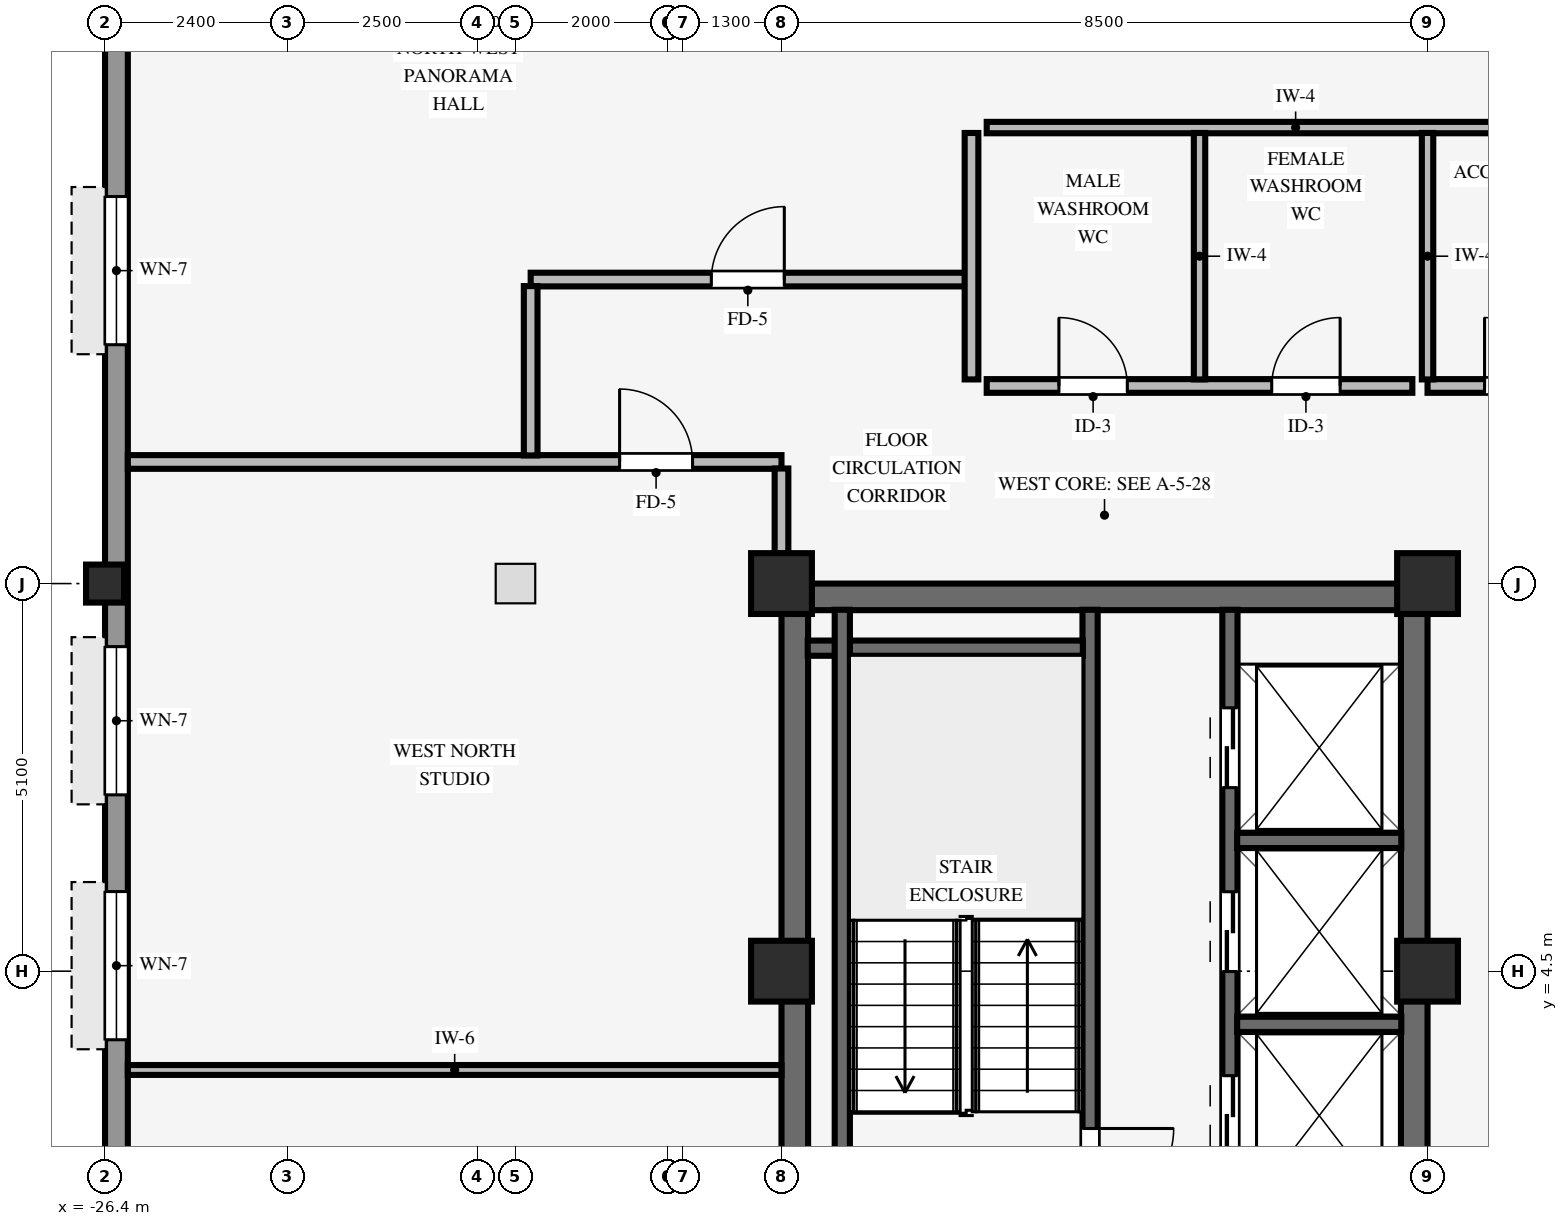
"""IFC4 building model, lengths in metres.
Left out: names, types, materials, properties, quantities, classifications, styles, units other than length and angle.
Written with IfcOpenShell. Run it as: python <this file> out.ifc"""

import sys

from ifc_helpers import new_model, si_unit, direction, frame, frame_2d, origin, origin_2d, place, context, subcontext, project, spatial, rectangle, hollow_rectangle, extrude, source, transform, mapped, element, fill, save


model = new_model("IFC4")
c1 = context("Model", 3, precision=1e-05, world=origin(), true_north=direction((0.0, 1.0)))
c2 = subcontext(c1, "Body", "Model", "MODEL_VIEW")
j1 = project(units=[si_unit("LENGTHUNIT", "METRE"), si_unit("PLANEANGLEUNIT", "RADIAN")], contexts=[c1])
p1 = place(None, origin())
s1 = spatial("IfcSite", under=j1, at=p1, CompositionType="ELEMENT")
p2 = place(p1, origin())
s2 = spatial("IfcBuilding", under=s1, at=p2, CompositionType="ELEMENT")
p3 = place(p2, frame((0.0, 0.0, 242.0)))
s3 = spatial("IfcBuildingStorey", under=s2, at=p3, CompositionType="ELEMENT", Elevation=242.0)
p4 = place(p3, frame((-17.5, 9.425, 0.0), z_axis=(0.0, 0.0, 1.0), x_axis=(1.0, 0.0, 0.0)))
e1 = element("IfcWall", 1, at=p4, inside=s3, PredefinedType="SHEAR", context=c2, shape_type="SweptSolid", body=[
    extrude(rectangle(XDim=8.5, YDim=0.35, at=frame_2d((4.25, 0.0))), origin(), (0.0, 0.0, 1.0), 3.25),
])
p5 = place(p3, frame((-17.325, -9.255, 0.0), z_axis=(0.0, 0.0, 1.0), x_axis=(0.0, 1.0, 0.0)))
e2 = element("IfcWall", 2, at=p5, inside=s3, PredefinedType="SHEAR", context=c2, shape_type="SweptSolid", body=[
    extrude(rectangle(XDim=18.51, YDim=0.35, at=frame_2d((9.255, 0.0))), origin(), (0.0, 0.0, 1.0), 3.25),
])
p6 = place(p3, frame((-9.175, -9.255, 0.0), z_axis=(0.0, 0.0, 1.0), x_axis=(0.0, 1.0, 0.0)))
e3 = element("IfcWall", 3, at=p6, inside=s3, PredefinedType="SHEAR", context=c2, shape_type="SweptSolid", body=[
    extrude(rectangle(XDim=18.51, YDim=0.35, at=frame_2d((9.255, 0.0))), origin(), (0.0, 0.0, 1.0), 3.25),
])
p7 = place(p6, frame((8.655, 0.0, 0.0)))
e4 = element("IfcOpeningElement", 4, at=p7, cuts=e3, PredefinedType="OPENING", context=c2, shape_type="SweptSolid", body=[
    extrude(rectangle(XDim=1.2, YDim=2.15, at=frame_2d((0.6, 1.075))), frame((0.0, 0.185, 0.0), z_axis=(0.0, -1.0, 0.0), x_axis=(1.0, 0.0, 0.0)), (0.0, 0.0, 1.0), 0.37),
])
for number, where, z_axis, x_axis in (
    (5, (-17.5, 4.5, 0.0), (0.0, 0.0, 1.0), (1.0, 0.0, 0.0)),
    (6, (-17.5, 9.6, 0.0), (0.0, 0.0, 1.0), (1.0, 0.0, 0.0)),
    (7, (-9.0, 4.5, 0.0), (0.0, 0.0, 1.0), (1.0, 0.0, 0.0)),
    (8, (-9.0, 9.6, 0.0), (0.0, 0.0, 1.0), (1.0, 0.0, 0.0)),
):
    element("IfcColumn", number, at=place(p3, frame(where, z_axis=z_axis, x_axis=x_axis)), inside=s3, PredefinedType="COLUMN", context=c2, shape_type="SweptSolid", body=[
        extrude(rectangle(XDim=0.8, YDim=0.8, at=origin_2d()), origin(), (0.0, 0.0, 1.0), 3.25),
    ])
p8 = place(p3, frame((-26.4, 9.6, 0.0), z_axis=(0.0, 0.0, 1.0), x_axis=(1.0, 0.0, 0.0)))
e9 = element("IfcColumn", 9, at=p8, inside=s3, PredefinedType="COLUMN", context=c2, shape_type="SweptSolid", body=[
    extrude(hollow_rectangle(XDim=0.5, YDim=0.5, WallThickness=0.032, InnerFilletRadius=0.032, OuterFilletRadius=0.064, at=origin_2d()), origin(), (0.0, 0.0, 1.0), 3.25),
])
p9 = place(p3, frame((-26.25, -17.004, 0.0), z_axis=(0.0, 0.0, 1.0), x_axis=(0.0, 1.0, 0.0)))
e10 = element("IfcWall", 10, at=p9, inside=s3, PredefinedType="STANDARD", context=c2, shape_type="SweptSolid", body=[
    extrude(rectangle(XDim=34.008, YDim=0.3, at=frame_2d((17.004, 0.0))), origin(), (0.0, 0.0, 1.0), 2.812),
])
p10 = place(p9, frame((2.311, 0.0, 0.8)))
e11 = element("IfcOpeningElement", 11, at=p10, cuts=e10, PredefinedType="OPENING", context=c2, shape_type="SweptSolid", body=[
    extrude(rectangle(XDim=1.95, YDim=1.48, at=frame_2d((0.975, 0.74))), frame((0.0, 0.16, 0.0), z_axis=(0.0, -1.0, 0.0), x_axis=(1.0, 0.0, 0.0)), (0.0, 0.0, 1.0), 0.32),
])
p11 = place(p9, frame((8.234, 0.0, 0.8)))
e12 = element("IfcOpeningElement", 12, at=p11, cuts=e10, PredefinedType="OPENING", context=c2, shape_type="SweptSolid", body=[
    extrude(rectangle(XDim=1.95, YDim=1.48, at=frame_2d((0.975, 0.74))), frame((0.0, 0.16, 0.0), z_axis=(0.0, -1.0, 0.0), x_axis=(1.0, 0.0, 0.0)), (0.0, 0.0, 1.0), 0.32),
])
p12 = place(p9, frame((11.456, 0.0, 0.8)))
e13 = element("IfcOpeningElement", 13, at=p12, cuts=e10, PredefinedType="OPENING", context=c2, shape_type="SweptSolid", body=[
    extrude(rectangle(XDim=1.95, YDim=1.48, at=frame_2d((0.975, 0.74))), frame((0.0, 0.16, 0.0), z_axis=(0.0, -1.0, 0.0), x_axis=(1.0, 0.0, 0.0)), (0.0, 0.0, 1.0), 0.32),
])
p13 = place(p9, frame((20.602, 0.0, 0.8)))
e14 = element("IfcOpeningElement", 14, at=p13, cuts=e10, PredefinedType="OPENING", context=c2, shape_type="SweptSolid", body=[
    extrude(rectangle(XDim=1.95, YDim=1.48, at=frame_2d((0.975, 0.74))), frame((0.0, 0.16, 0.0), z_axis=(0.0, -1.0, 0.0), x_axis=(1.0, 0.0, 0.0)), (0.0, 0.0, 1.0), 0.32),
])
p14 = place(p9, frame((23.824, 0.0, 0.8)))
e15 = element("IfcOpeningElement", 15, at=p14, cuts=e10, PredefinedType="OPENING", context=c2, shape_type="SweptSolid", body=[
    extrude(rectangle(XDim=1.95, YDim=1.48, at=frame_2d((0.975, 0.74))), frame((0.0, 0.16, 0.0), z_axis=(0.0, -1.0, 0.0), x_axis=(1.0, 0.0, 0.0)), (0.0, 0.0, 1.0), 0.32),
])
p15 = place(p9, frame((29.747, 0.0, 0.8)))
e16 = element("IfcOpeningElement", 16, at=p15, cuts=e10, PredefinedType="OPENING", context=c2, shape_type="SweptSolid", body=[
    extrude(rectangle(XDim=1.95, YDim=1.48, at=frame_2d((0.975, 0.74))), frame((0.0, 0.16, 0.0), z_axis=(0.0, -1.0, 0.0), x_axis=(1.0, 0.0, 0.0)), (0.0, 0.0, 1.0), 0.32),
])
p16 = place(p3, frame((-13.44, 0.9, 0.0), z_axis=(0.0, 0.0, 1.0), x_axis=(0.0, 1.0, 0.0)))
e17 = element("IfcWall", 17, at=p16, inside=s3, PredefinedType="SHEAR", context=c2, shape_type="SweptSolid", body=[
    extrude(rectangle(XDim=8.355, YDim=0.2, at=frame_2d((4.177, 0.0))), origin(), (0.0, 0.0, 1.0), 3.25),
])
p17 = place(p16, frame((1.53, 0.0, 0.0), z_axis=(0.0, 0.0, 1.0), x_axis=(-1.0, 0.0, 0.0)))
e18 = element("IfcOpeningElement", 18, at=p17, cuts=e17, PredefinedType="OPENING", context=c2, shape_type="SweptSolid", body=[
    extrude(rectangle(XDim=1.1, YDim=2.15, at=frame_2d((0.55, 1.075))), frame((0.0, 0.11, 0.0), z_axis=(0.0, -1.0, 0.0), x_axis=(1.0, 0.0, 0.0)), (0.0, 0.0, 1.0), 0.22),
])
p18 = place(p3, frame((-17.155, 8.75, 0.0), z_axis=(0.0, 0.0, 1.0), x_axis=(1.0, 0.0, 0.0)))
e19 = element("IfcWall", 19, at=p18, inside=s3, PredefinedType="SHEAR", context=c2, shape_type="SweptSolid", body=[
    extrude(rectangle(XDim=3.62, YDim=0.2, at=frame_2d((1.81, 0.0))), origin(), (0.0, 0.0, 1.0), 3.25),
])
p19 = place(p3, frame((-16.7, 1.095, 0.0), z_axis=(0.0, 0.0, 1.0), x_axis=(0.0, 1.0, 0.0)))
e20 = element("IfcWall", 20, at=p19, inside=s3, PredefinedType="SHEAR", context=c2, shape_type="SweptSolid", body=[
    extrude(rectangle(XDim=8.16, YDim=0.2, at=frame_2d((4.08, 0.0))), origin(), (0.0, 0.0, 1.0), 3.25),
])
p20 = place(p3, frame((-11.6, 1.3, 0.0), z_axis=(0.0, 0.0, 1.0), x_axis=(0.0, 1.0, 0.0)))
e21 = element("IfcWall", 21, at=p20, inside=s3, PredefinedType="SHEAR", context=c2, shape_type="SweptSolid", body=[
    extrude(rectangle(XDim=7.955, YDim=0.2, at=frame_2d((3.978, 0.0))), origin(), (0.0, 0.0, 1.0), 3.25),
])
p21 = place(p20, frame((0.775, 0.0, 0.0)))
e22 = element("IfcOpeningElement", 22, at=p21, cuts=e21, PredefinedType="OPENING", context=c2, shape_type="SweptSolid", body=[
    extrude(rectangle(XDim=1.05, YDim=2.15, at=frame_2d((0.525, 1.075))), frame((0.0, 0.11, 0.0), z_axis=(0.0, -1.0, 0.0), x_axis=(1.0, 0.0, 0.0)), (0.0, 0.0, 1.0), 0.22),
])
p22 = place(p20, frame((3.195, 0.0, 0.0)))
e23 = element("IfcOpeningElement", 23, at=p22, cuts=e21, PredefinedType="OPENING", context=c2, shape_type="SweptSolid", body=[
    extrude(rectangle(XDim=1.05, YDim=2.15, at=frame_2d((0.525, 1.075))), frame((0.0, 0.11, 0.0), z_axis=(0.0, -1.0, 0.0), x_axis=(1.0, 0.0, 0.0)), (0.0, 0.0, 1.0), 0.22),
])
p23 = place(p20, frame((5.615, 0.0, 0.0)))
e24 = element("IfcOpeningElement", 24, at=p23, cuts=e21, PredefinedType="OPENING", context=c2, shape_type="SweptSolid", body=[
    extrude(rectangle(XDim=1.05, YDim=2.15, at=frame_2d((0.525, 1.075))), frame((0.0, 0.11, 0.0), z_axis=(0.0, -1.0, 0.0), x_axis=(1.0, 0.0, 0.0)), (0.0, 0.0, 1.0), 0.22),
])
for number, where, z_axis, x_axis in (
    (25, (-11.505, 3.8, 0.0), (0.0, 0.0, 1.0), (1.0, 0.0, 0.0)),
    (26, (-11.505, 6.22, 0.0), (0.0, 0.0, 1.0), (1.0, 0.0, 0.0)),
):
    element("IfcWall", number, at=place(p3, frame(where, z_axis=z_axis, x_axis=x_axis)), inside=s3, PredefinedType="SHEAR", context=c2, shape_type="SweptSolid", body=[
        extrude(rectangle(XDim=2.16, YDim=0.2, at=frame_2d((1.08, 0.0))), origin(), (0.0, 0.0, 1.0), 3.25),
    ])
p24 = place(p3, frame((-26.1, 3.2, 0.0), z_axis=(0.0, 0.0, 1.0), x_axis=(1.0, 0.0, 0.0)))
e27 = element("IfcWall", 27, at=p24, inside=s3, PredefinedType="PARTITIONING", context=c2, shape_type="SweptSolid", body=[
    extrude(rectangle(XDim=8.6, YDim=0.13, at=frame_2d((4.3, 0.0))), origin(), (0.0, 0.0, 1.0), 3.24),
])
p25 = place(p3, frame((-26.1, 11.2, 0.0), z_axis=(0.0, 0.0, 1.0), x_axis=(1.0, 0.0, 0.0)))
e28 = element("IfcWall", 28, at=p25, inside=s3, PredefinedType="PARTITIONING", context=c2, shape_type="SweptSolid", body=[
    extrude(rectangle(XDim=8.6, YDim=0.18, at=frame_2d((4.3, 0.0))), origin(), (0.0, 0.0, 1.0), 3.24),
])
p26 = place(p25, frame((6.47, 0.0, 0.0)))
e29 = element("IfcOpeningElement", 29, at=p26, cuts=e28, PredefinedType="OPENING", context=c2, shape_type="SweptSolid", body=[
    extrude(rectangle(XDim=0.96, YDim=2.1, at=frame_2d((0.48, 1.05))), frame((0.0, 0.1, 0.0), z_axis=(0.0, -1.0, 0.0), x_axis=(1.0, 0.0, 0.0)), (0.0, 0.0, 1.0), 0.2),
])
p27 = place(p3, frame((-14.8, 12.2, 0.0), z_axis=(0.0, 0.0, 1.0), x_axis=(1.0, 0.0, 0.0)))
e30 = element("IfcWall", 30, at=p27, inside=s3, PredefinedType="PARTITIONING", context=c2, shape_type="SweptSolid", body=[
    extrude(rectangle(XDim=5.6, YDim=0.18, at=frame_2d((2.8, 0.0))), origin(), (0.0, 0.0, 1.0), 3.24),
])
p28 = place(p27, frame((0.95, 0.0, 0.0)))
e31 = element("IfcOpeningElement", 31, at=p28, cuts=e30, PredefinedType="OPENING", context=c2, shape_type="SweptSolid", body=[
    extrude(rectangle(XDim=0.9, YDim=2.1, at=frame_2d((0.45, 1.05))), frame((0.0, 0.1, 0.0), z_axis=(0.0, -1.0, 0.0), x_axis=(1.0, 0.0, 0.0)), (0.0, 0.0, 1.0), 0.2),
])
p29 = place(p27, frame((3.75, 0.0, 0.0)))
e32 = element("IfcOpeningElement", 32, at=p29, cuts=e30, PredefinedType="OPENING", context=c2, shape_type="SweptSolid", body=[
    extrude(rectangle(XDim=0.9, YDim=2.1, at=frame_2d((0.45, 1.05))), frame((0.0, 0.1, 0.0), z_axis=(0.0, -1.0, 0.0), x_axis=(1.0, 0.0, 0.0)), (0.0, 0.0, 1.0), 0.2),
])
p30 = place(p3, frame((-9.0, 12.2, 0.0), z_axis=(0.0, 0.0, 1.0), x_axis=(1.0, 0.0, 0.0)))
e33 = element("IfcWall", 33, at=p30, inside=s3, PredefinedType="PARTITIONING", context=c2, shape_type="SweptSolid", body=[
    extrude(rectangle(XDim=24.8, YDim=0.18, at=frame_2d((12.4, 0.0))), origin(), (0.0, 0.0, 1.0), 3.24),
])
p31 = place(p30, frame((11.42, 0.0, 0.0)))
e34 = element("IfcOpeningElement", 34, at=p31, cuts=e33, PredefinedType="OPENING", context=c2, shape_type="SweptSolid", body=[
    extrude(rectangle(XDim=0.96, YDim=2.1, at=frame_2d((0.48, 1.05))), frame((0.0, 0.1, 0.0), z_axis=(0.0, -1.0, 0.0), x_axis=(1.0, 0.0, 0.0)), (0.0, 0.0, 1.0), 0.2),
])
p32 = place(p30, frame((20.92, 0.0, 0.0)))
e35 = element("IfcOpeningElement", 35, at=p32, cuts=e33, PredefinedType="OPENING", context=c2, shape_type="SweptSolid", body=[
    extrude(rectangle(XDim=0.96, YDim=2.1, at=frame_2d((0.48, 1.05))), frame((0.0, 0.1, 0.0), z_axis=(0.0, -1.0, 0.0), x_axis=(1.0, 0.0, 0.0)), (0.0, 0.0, 1.0), 0.2),
])
p33 = place(p30, frame((4.82, 0.0, 0.0)))
e36 = element("IfcOpeningElement", 36, at=p33, cuts=e33, PredefinedType="OPENING", context=c2, shape_type="SweptSolid", body=[
    extrude(rectangle(XDim=0.96, YDim=2.1, at=frame_2d((0.48, 1.05))), frame((0.0, 0.1, 0.0), z_axis=(0.0, -1.0, 0.0), x_axis=(1.0, 0.0, 0.0)), (0.0, 0.0, 1.0), 0.2),
])
p34 = place(p30, frame((0.75, 0.0, 0.0)))
e37 = element("IfcOpeningElement", 37, at=p34, cuts=e33, PredefinedType="OPENING", context=c2, shape_type="SweptSolid", body=[
    extrude(rectangle(XDim=0.9, YDim=2.1, at=frame_2d((0.45, 1.05))), frame((0.0, 0.1, 0.0), z_axis=(0.0, -1.0, 0.0), x_axis=(1.0, 0.0, 0.0)), (0.0, 0.0, 1.0), 0.2),
])
p35 = place(p3, frame((-20.8, 13.6, 0.0), z_axis=(0.0, 0.0, 1.0), x_axis=(1.0, 0.0, 0.0)))
e38 = element("IfcWall", 38, at=p35, inside=s3, PredefinedType="PARTITIONING", context=c2, shape_type="SweptSolid", body=[
    extrude(rectangle(XDim=5.714, YDim=0.18, at=frame_2d((2.857, 0.0))), origin(), (0.0, 0.0, 1.0), 2.929),
])
p36 = place(p35, frame((2.377, 0.0, 0.0)))
e39 = element("IfcOpeningElement", 39, at=p36, cuts=e38, PredefinedType="OPENING", context=c2, shape_type="SweptSolid", body=[
    extrude(rectangle(XDim=0.96, YDim=2.1, at=frame_2d((0.48, 1.05))), frame((0.0, 0.1, 0.0), z_axis=(0.0, -1.0, 0.0), x_axis=(1.0, 0.0, 0.0)), (0.0, 0.0, 1.0), 0.2),
])
p37 = place(p3, frame((-14.8, 15.6, 0.0), z_axis=(0.0, 0.0, 1.0), x_axis=(1.0, 0.0, 0.0)))
e40 = element("IfcWall", 40, at=p37, inside=s3, PredefinedType="PARTITIONING", context=c2, shape_type="SweptSolid", body=[
    extrude(rectangle(XDim=8.129, YDim=0.15, at=frame_2d((4.064, 0.0))), origin(), (0.0, 0.0, 1.0), 3.24),
])
p38 = place(p3, frame((-20.8, 11.286, 0.0), z_axis=(0.0, 0.0, 1.0), x_axis=(0.0, 1.0, 0.0)))
e41 = element("IfcWall", 41, at=p38, inside=s3, PredefinedType="PARTITIONING", context=c2, shape_type="SweptSolid", body=[
    extrude(rectangle(XDim=2.228, YDim=0.18, at=frame_2d((1.114, 0.0))), origin(), (0.0, 0.0, 1.0), 2.585),
])
p39 = place(p3, frame((-17.5, 9.996, 0.0), z_axis=(0.0, 0.0, 1.0), x_axis=(0.0, 1.0, 0.0)))
e42 = element("IfcWall", 42, at=p39, inside=s3, PredefinedType="PARTITIONING", context=c2, shape_type="SweptSolid", body=[
    extrude(rectangle(XDim=1.118, YDim=0.18, at=frame_2d((0.559, 0.0))), origin(), (0.0, 0.0, 1.0), 2.772),
])
p40 = place(p3, frame((-15.0, 12.286, 0.0), z_axis=(0.0, 0.0, 1.0), x_axis=(0.0, 1.0, 0.0)))
e43 = element("IfcWall", 43, at=p40, inside=s3, PredefinedType="PARTITIONING", context=c2, shape_type="SweptSolid", body=[
    extrude(rectangle(XDim=3.243, YDim=0.18, at=frame_2d((1.622, 0.0))), origin(), (0.0, 0.0, 1.0), 3.24),
])
p41 = place(p3, frame((-12.0, 12.286, 0.0), z_axis=(0.0, 0.0, 1.0), x_axis=(0.0, 1.0, 0.0)))
e44 = element("IfcWall", 44, at=p41, inside=s3, PredefinedType="PARTITIONING", context=c2, shape_type="SweptSolid", body=[
    extrude(rectangle(XDim=3.243, YDim=0.15, at=frame_2d((1.622, 0.0))), origin(), (0.0, 0.0, 1.0), 3.24),
])
p42 = place(p3, frame((-9.0, 12.286, 0.0), z_axis=(0.0, 0.0, 1.0), x_axis=(0.0, 1.0, 0.0)))
e45 = element("IfcWall", 45, at=p42, inside=s3, PredefinedType="PARTITIONING", context=c2, shape_type="SweptSolid", body=[
    extrude(rectangle(XDim=3.243, YDim=0.15, at=frame_2d((1.622, 0.0))), origin(), (0.0, 0.0, 1.0), 2.772),
])
m1 = source(origin(), c2, "Body", "SweptSolid", [
    extrude(rectangle(XDim=1.95, YDim=1.48, at=frame_2d((0.975, 0.74))), frame((0.0, 0.03, 0.0), z_axis=(0.0, -1.0, 0.0), x_axis=(1.0, 0.0, 0.0)), (0.0, 0.0, 1.0), 0.06),
])
p43 = place(p13, origin())
e46 = element("IfcWindow", 46, at=p43, inside=s3, PartitioningType="SINGLE_PANEL", PredefinedType="WINDOW", context=c2, shape_type="MappedRepresentation", body=[
    mapped(m1, transform((0.0, 0.0, 0.0), scale=1.0)),
])
fill(e14, e46)
p44 = place(p14, origin())
e47 = element("IfcWindow", 47, at=p44, inside=s3, PartitioningType="SINGLE_PANEL", PredefinedType="WINDOW", context=c2, shape_type="MappedRepresentation", body=[
    mapped(m1, transform((0.0, 0.0, 0.0), scale=1.0)),
])
fill(e15, e47)
p45 = place(p15, origin())
e48 = element("IfcWindow", 48, at=p45, inside=s3, PartitioningType="SINGLE_PANEL", PredefinedType="WINDOW", context=c2, shape_type="MappedRepresentation", body=[
    mapped(m1, transform((0.0, 0.0, 0.0), scale=1.0)),
])
fill(e16, e48)
m2 = source(origin(), c2, "Body", "SweptSolid", [
    extrude(rectangle(XDim=1.1, YDim=2.15, at=frame_2d((0.55, 1.075))), frame((0.0, 0.025, 0.0), z_axis=(0.0, -1.0, 0.0), x_axis=(1.0, 0.0, 0.0)), (0.0, 0.0, 1.0), 0.05),
])
p46 = place(p17, origin())
e49 = element("IfcDoor", 49, at=p46, inside=s3, OperationType="SINGLE_SWING_LEFT", PredefinedType="DOOR", context=c2, shape_type="MappedRepresentation", body=[
    mapped(m2, transform((0.0, 0.0, 0.0), scale=1.0)),
])
fill(e18, e49)
m3 = source(origin(), c2, "Body", "SweptSolid", [
    extrude(rectangle(XDim=1.05, YDim=2.15, at=frame_2d((0.525, 1.075))), frame((0.0, 0.025, 0.0), z_axis=(0.0, -1.0, 0.0), x_axis=(1.0, 0.0, 0.0)), (0.0, 0.0, 1.0), 0.05),
])
p47 = place(p21, origin())
e50 = element("IfcDoor", 50, at=p47, inside=s3, OperationType="DOUBLE_DOOR_SLIDING", PredefinedType="DOOR", context=c2, shape_type="MappedRepresentation", body=[
    mapped(m3, transform((0.0, 0.0, 0.0), scale=1.0)),
])
fill(e22, e50)
p48 = place(p22, origin())
e51 = element("IfcDoor", 51, at=p48, inside=s3, OperationType="DOUBLE_DOOR_SLIDING", PredefinedType="DOOR", context=c2, shape_type="MappedRepresentation", body=[
    mapped(m3, transform((0.0, 0.0, 0.0), scale=1.0)),
])
fill(e23, e51)
p49 = place(p23, origin())
e52 = element("IfcDoor", 52, at=p49, inside=s3, OperationType="DOUBLE_DOOR_SLIDING", PredefinedType="DOOR", context=c2, shape_type="MappedRepresentation", body=[
    mapped(m3, transform((0.0, 0.0, 0.0), scale=1.0)),
])
fill(e24, e52)
m4 = source(origin(), c2, "Body", "SweptSolid", [
    extrude(rectangle(XDim=0.96, YDim=2.1, at=frame_2d((0.48, 1.05))), frame((0.0, 0.025, 0.0), z_axis=(0.0, -1.0, 0.0), x_axis=(1.0, 0.0, 0.0)), (0.0, 0.0, 1.0), 0.05),
])
p50 = place(p36, origin())
e53 = element("IfcDoor", 53, at=p50, inside=s3, OperationType="SINGLE_SWING_RIGHT", PredefinedType="DOOR", context=c2, shape_type="MappedRepresentation", body=[
    mapped(m4, transform((0.0, 0.0, 0.0), scale=1.0)),
])
fill(e39, e53)
p51 = place(p26, origin())
e54 = element("IfcDoor", 54, at=p51, inside=s3, OperationType="SINGLE_SWING_LEFT", PredefinedType="DOOR", context=c2, shape_type="MappedRepresentation", body=[
    mapped(m4, transform((0.0, 0.0, 0.0), scale=1.0)),
])
fill(e29, e54)
m5 = source(origin(), c2, "Body", "SweptSolid", [
    extrude(rectangle(XDim=0.9, YDim=2.1, at=frame_2d((0.45, 1.05))), frame((0.0, 0.025, 0.0), z_axis=(0.0, -1.0, 0.0), x_axis=(1.0, 0.0, 0.0)), (0.0, 0.0, 1.0), 0.05),
])
p52 = place(p28, origin())
e55 = element("IfcDoor", 55, at=p52, inside=s3, OperationType="SINGLE_SWING_LEFT", PredefinedType="DOOR", context=c2, shape_type="MappedRepresentation", body=[
    mapped(m5, transform((0.0, 0.0, 0.0), scale=1.0)),
])
fill(e31, e55)
p53 = place(p29, origin())
e56 = element("IfcDoor", 56, at=p53, inside=s3, OperationType="SINGLE_SWING_RIGHT", PredefinedType="DOOR", context=c2, shape_type="MappedRepresentation", body=[
    mapped(m5, transform((0.0, 0.0, 0.0), scale=1.0)),
])
fill(e32, e56)
p54 = place(p34, origin())
e57 = element("IfcDoor", 57, at=p54, inside=s3, OperationType="SINGLE_SWING_LEFT", PredefinedType="DOOR", context=c2, shape_type="MappedRepresentation", body=[
    mapped(m5, transform((0.0, 0.0, 0.0), scale=1.0)),
])
fill(e37, e57)
save(model, sys.argv[1])
